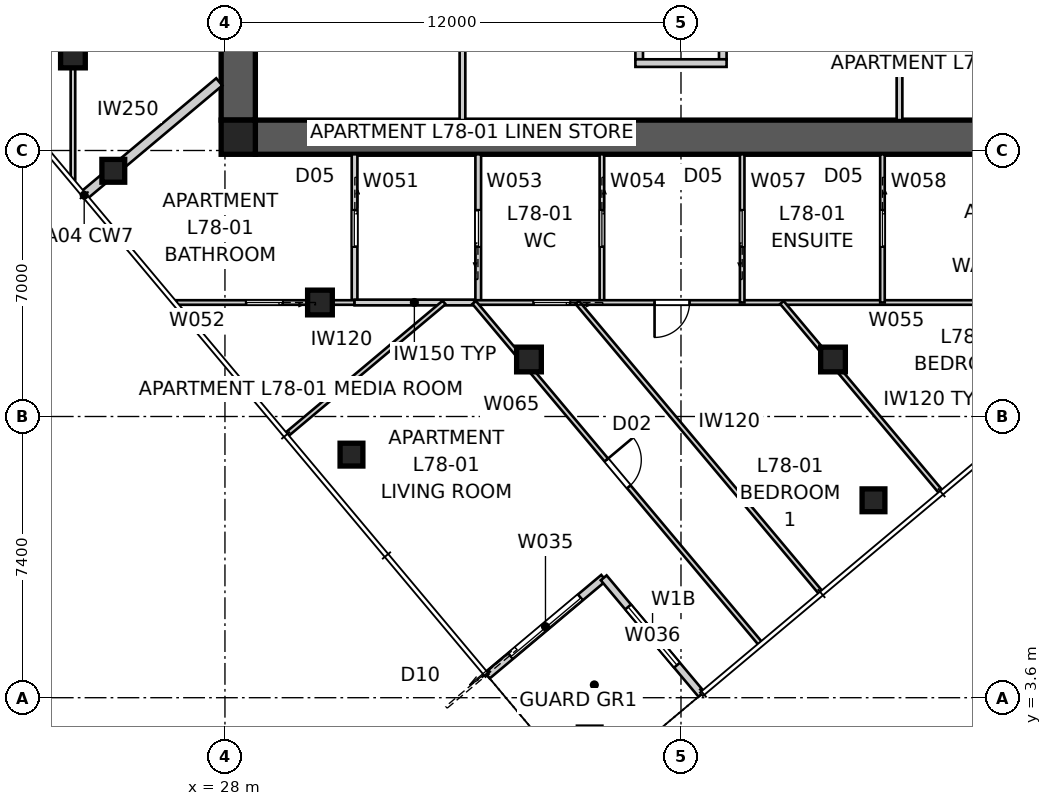
"""IFC4 building model, lengths in metres.
Left out: names, types, materials, properties, quantities, classifications, styles, units other than length and angle.
Written with IfcOpenShell. Run it as: python <this file> out.ifc"""

import sys

from ifc_helpers import new_model, si_unit, direction, frame, frame_2d, origin, origin_2d, place, context, subcontext, project, spatial, polyline, rectangle, outline, extrude, element, fill, save


model = new_model("IFC4")
c1 = context("Model", 3, precision=1e-05, world=origin(), true_north=direction((0.0, 1.0)))
c2 = subcontext(c1, "Body", "Model", "MODEL_VIEW")
j1 = project(units=[si_unit("LENGTHUNIT", "METRE"), si_unit("PLANEANGLEUNIT", "RADIAN")], contexts=[c1])
p1 = place(None, origin())
s1 = spatial("IfcSite", under=j1, at=p1, CompositionType="ELEMENT")
p2 = place(p1, origin())
s2 = spatial("IfcBuilding", under=s1, at=p2, CompositionType="ELEMENT")
p3 = place(p2, frame((0.0, 0.0, 282.8)))
s3 = spatial("IfcBuildingStorey", under=s2, at=p3, CompositionType="ELEMENT", Elevation=282.8)
p4 = place(p3, frame((51.2, 18.35, 0.0), z_axis=(0.0, 0.0, 1.0), x_axis=(-1.0, 0.0, 0.0)))
e1 = element("IfcWall", 1, at=p4, inside=s3, PredefinedType="SHEAR", context=c2, shape_type="SweptSolid", body=[
    extrude(outline(polyline([(0.0, -0.45), (22.4, -0.45), (22.4, -0.025), (22.85, -0.025), (22.85, 0.025), (22.4, 0.025), (22.4, 0.45), (0.0, 0.45), (0.0, 0.025), (-0.45, 0.025), (-0.45, -0.025), (0.0, -0.025), (0.0, -0.45)])), origin(), (0.0, 0.0, 1.0), 3.4),
])
p5 = place(p3, frame((28.35, 41.2, 0.0), z_axis=(0.0, 0.0, 1.0), x_axis=(0.0, -1.0, 0.0)))
e2 = element("IfcWall", 2, at=p5, inside=s3, PredefinedType="SHEAR", context=c2, shape_type="SweptSolid", body=[
    extrude(outline(polyline([(0.0, -0.45), (22.4, -0.45), (22.4, -0.025), (22.85, -0.025), (22.85, 0.025), (22.4, 0.025), (22.4, 0.45), (0.0, 0.45), (0.0, 0.025), (-0.45, 0.025), (-0.45, -0.025), (0.0, -0.025), (0.0, -0.45)])), origin(), (0.0, 0.0, 1.0), 3.4),
])
p6 = place(p5, frame((11.14, 0.0, 0.0)))
e3 = element("IfcOpeningElement", 3, at=p6, cuts=e2, PredefinedType="OPENING", context=c2, shape_type="SweptSolid", body=[
    extrude(rectangle(XDim=1.02, YDim=2.4, at=frame_2d((0.51, 1.2))), frame((0.0, 0.46, 0.0), z_axis=(0.0, -1.0, 0.0), x_axis=(1.0, 0.0, 0.0)), (0.0, 0.0, 1.0), 0.92),
])
for number, where, z_axis, x_axis in (
    (4, (38.9, 22.4, 0.0), (0.0, 0.0, 1.0), (0.0, -1.0, 0.0)),
    (5, (41.1, 22.4, 0.0), (0.0, 0.0, 1.0), (0.0, -1.0, 0.0)),
):
    element("IfcWall", number, at=place(p3, frame(where, z_axis=z_axis, x_axis=x_axis)), inside=s3, PredefinedType="SOLIDWALL", context=c2, shape_type="SweptSolid", body=[
        extrude(rectangle(XDim=2.0, YDim=0.2, at=frame_2d((1.0, 0.0))), origin(), (0.0, 0.0, 1.0), 3.4),
    ])
p7 = place(p3, frame((38.8, 20.3, 0.0), z_axis=(0.0, 0.0, 1.0), x_axis=(1.0, 0.0, 0.0)))
e6 = element("IfcWall", 6, at=p7, inside=s3, PredefinedType="SOLIDWALL", context=c2, shape_type="SweptSolid", body=[
    extrude(rectangle(XDim=2.4, YDim=0.2, at=frame_2d((1.2, 0.0))), origin(), (0.0, 0.0, 1.0), 3.4),
])
p8 = place(p3, frame((28.35, 18.35, 0.0), z_axis=(0.0, 0.0, 1.0), x_axis=(1.0, 0.0, 0.0)))
e7 = element("IfcColumn", 7, at=p8, inside=s3, PredefinedType="COLUMN", context=c2, shape_type="SweptSolid", body=[
    extrude(rectangle(XDim=0.9, YDim=0.9, at=origin_2d()), origin(), (0.0, 0.0, 1.0), 3.4),
])
for number, where, z_axis, x_axis in (
    (8, (45.065, 8.795, 0.0), (0.0, 0.0, 1.0), (1.0, 0.0, 0.0)),
    (9, (25.062, 17.466, 0.0), (0.0, 0.0, 1.0), (1.0, 0.0, 0.0)),
    (10, (31.329, 9.997, 0.0), (0.0, 0.0, 1.0), (1.0, 0.0, 0.0)),
):
    element("IfcColumn", number, at=place(p3, frame(where, z_axis=z_axis, x_axis=x_axis)), inside=s3, PredefinedType="COLUMN", context=c2, shape_type="SweptSolid", body=[
        extrude(rectangle(XDim=0.6, YDim=0.6, at=origin_2d()), origin(), (0.0, 0.0, 1.0), 3.4),
    ])
for number, where, z_axis, x_axis in (
    (11, (24.0, 20.5, 0.0), (0.0, 0.0, 1.0), (1.0, 0.0, 0.0)),
    (12, (30.5, 14.0, 0.0), (0.0, 0.0, 1.0), (1.0, 0.0, 0.0)),
    (13, (36.0, 12.5, 0.0), (0.0, 0.0, 1.0), (1.0, 0.0, 0.0)),
    (14, (44.0, 12.5, 0.0), (0.0, 0.0, 1.0), (1.0, 0.0, 0.0)),
):
    element("IfcColumn", number, at=place(p3, frame(where, z_axis=z_axis, x_axis=x_axis)), inside=s3, PredefinedType="COLUMN", context=c2, shape_type="SweptSolid", body=[
        extrude(rectangle(XDim=0.65, YDim=0.65, at=origin_2d()), origin(), (0.0, 0.0, 1.0), 3.4),
    ])
p9 = place(p3, frame((34.902, 4.183, 0.0), z_axis=(0.0, 0.0, 1.0), x_axis=(0.766060656284, 0.642768287094, 0.0)))
e15 = element("IfcWall", 15, at=p9, inside=s3, PredefinedType="SOLIDWALL", context=c2, shape_type="SweptSolid", body=[
    extrude(rectangle(XDim=4.0, YDim=0.2, at=frame_2d((2.0, 0.0))), origin(), (0.0, 0.0, 1.0), 3.25),
])
p10 = place(p9, frame((0.8, 0.0, 0.0)))
e16 = element("IfcOpeningElement", 16, at=p10, cuts=e15, PredefinedType="OPENING", context=c2, shape_type="SweptSolid", body=[
    extrude(rectangle(XDim=2.4, YDim=2.4, at=frame_2d((1.2, 1.2))), frame((0.0, 0.11, 0.0), z_axis=(0.0, -1.0, 0.0), x_axis=(1.0, 0.0, 0.0)), (0.0, 0.0, 1.0), 0.22),
])
p11 = place(p3, frame((37.966, 6.754, 0.0), z_axis=(0.0, 0.0, 1.0), x_axis=(0.642798342015, -0.766035437498, 0.0)))
e17 = element("IfcWall", 17, at=p11, inside=s3, PredefinedType="SOLIDWALL", context=c2, shape_type="SweptSolid", body=[
    extrude(rectangle(XDim=4.0, YDim=0.2, at=frame_2d((2.0, 0.0))), origin(), (0.0, 0.0, 1.0), 3.25),
])
p12 = place(p11, frame((1.0, 0.0, 0.45)))
e18 = element("IfcOpeningElement", 18, at=p12, cuts=e17, PredefinedType="OPENING", context=c2, shape_type="SweptSolid", body=[
    extrude(rectangle(XDim=2.0, YDim=1.8, at=frame_2d((1.0, 0.9))), frame((0.0, 0.11, 0.0), z_axis=(0.0, -1.0, 0.0), x_axis=(1.0, 0.0, 0.0)), (0.0, 0.0, 1.0), 0.22),
])
p13 = place(p3, frame((24.296, 16.823, 0.0), z_axis=(0.0, 0.0, 1.0), x_axis=(0.76603440109, 0.64279957712, 0.0)))
e19 = element("IfcWall", 19, at=p13, inside=s3, PredefinedType="PARTITIONING", context=c2, shape_type="SweptSolid", body=[
    extrude(rectangle(XDim=4.64, YDim=0.25, at=frame_2d((2.32, 0.0))), origin(), (0.0, 0.0, 1.0), 3.25),
])
p14 = place(p3, frame((45.75, 18.8, 0.0), z_axis=(0.0, 0.0, 1.0), x_axis=(0.0, 1.0, 0.0)))
e20 = element("IfcWall", 20, at=p14, inside=s3, PredefinedType="SOLIDWALL", context=c2, shape_type="SweptSolid", body=[
    extrude(rectangle(XDim=5.95, YDim=0.15, at=frame_2d((2.975, 0.0))), origin(), (0.0, 0.0, 1.0), 3.25),
])
p15 = place(p14, frame((2.515, 0.0, 0.0)))
e21 = element("IfcOpeningElement", 21, at=p15, cuts=e20, PredefinedType="OPENING", context=c2, shape_type="SweptSolid", body=[
    extrude(rectangle(XDim=0.92, YDim=2.1, at=frame_2d((0.46, 1.05))), frame((0.0, 0.085, 0.0), z_axis=(0.0, -1.0, 0.0), x_axis=(1.0, 0.0, 0.0)), (0.0, 0.0, 1.0), 0.17),
])
p16 = place(p3, frame((34.25, 18.8, 0.0), z_axis=(0.0, 0.0, 1.0), x_axis=(0.0, 1.0, 0.0)))
e22 = element("IfcWall", 22, at=p16, inside=s3, PredefinedType="SOLIDWALL", context=c2, shape_type="SweptSolid", body=[
    extrude(rectangle(XDim=5.9, YDim=0.15, at=frame_2d((2.95, 0.0))), origin(), (0.0, 0.0, 1.0), 3.25),
])
p17 = place(p3, frame((31.41, 17.9, 0.0), z_axis=(0.0, 0.0, 1.0), x_axis=(0.0, -1.0, 0.0)))
e23 = element("IfcWall", 23, at=p17, inside=s3, PredefinedType="SOLIDWALL", context=c2, shape_type="SweptSolid", body=[
    extrude(rectangle(XDim=3.9, YDim=0.15, at=frame_2d((1.95, 0.0))), origin(), (0.0, 0.0, 1.0), 3.25),
])
p18 = place(p17, frame((1.47, 0.0, 0.0)))
e24 = element("IfcOpeningElement", 24, at=p18, cuts=e23, PredefinedType="OPENING", context=c2, shape_type="SweptSolid", body=[
    extrude(rectangle(XDim=0.96, YDim=2.1, at=frame_2d((0.48, 1.05))), frame((0.0, 0.085, 0.0), z_axis=(0.0, -1.0, 0.0), x_axis=(1.0, 0.0, 0.0)), (0.0, 0.0, 1.0), 0.17),
])
p19 = place(p3, frame((31.41, 14.0, 0.0), z_axis=(0.0, 0.0, 1.0), x_axis=(-1.0, 0.0, 0.0)))
e25 = element("IfcWall", 25, at=p19, inside=s3, PredefinedType="PARTITIONING", context=c2, shape_type="SweptSolid", body=[
    extrude(rectangle(XDim=4.693, YDim=0.12, at=frame_2d((2.347, 0.0))), origin(), (0.0, 0.0, 1.0), 2.549),
])
p20 = place(p19, frame((1.893, 0.0, 0.0)))
e26 = element("IfcOpeningElement", 26, at=p20, cuts=e25, PredefinedType="OPENING", context=c2, shape_type="SweptSolid", body=[
    extrude(rectangle(XDim=0.96, YDim=2.1, at=frame_2d((0.48, 1.05))), frame((0.0, 0.07, 0.0), z_axis=(0.0, -1.0, 0.0), x_axis=(1.0, 0.0, 0.0)), (0.0, 0.0, 1.0), 0.14),
])
p21 = place(p3, frame((34.665, 14.0, 0.0), z_axis=(0.0, 0.0, 1.0), x_axis=(0.0, 1.0, 0.0)))
e27 = element("IfcWall", 27, at=p21, inside=s3, PredefinedType="SOLIDWALL", context=c2, shape_type="SweptSolid", body=[
    extrude(rectangle(XDim=3.9, YDim=0.15, at=frame_2d((1.95, 0.0))), origin(), (0.0, 0.0, 1.0), 3.25),
])
p22 = place(p21, frame((1.47, 0.0, 0.0)))
e28 = element("IfcOpeningElement", 28, at=p22, cuts=e27, PredefinedType="OPENING", context=c2, shape_type="SweptSolid", body=[
    extrude(rectangle(XDim=0.96, YDim=2.1, at=frame_2d((0.48, 1.05))), frame((0.0, 0.085, 0.0), z_axis=(0.0, -1.0, 0.0), x_axis=(1.0, 0.0, 0.0)), (0.0, 0.0, 1.0), 0.17),
])
p23 = place(p3, frame((37.919, 17.9, 0.0), z_axis=(0.0, 0.0, 1.0), x_axis=(0.0, -1.0, 0.0)))
e29 = element("IfcWall", 29, at=p23, inside=s3, PredefinedType="PARTITIONING", context=c2, shape_type="SweptSolid", body=[
    extrude(rectangle(XDim=3.9, YDim=0.12, at=frame_2d((1.95, 0.0))), origin(), (0.0, 0.0, 1.0), 3.25),
])
p24 = place(p23, frame((1.47, 0.0, 0.0)))
e30 = element("IfcOpeningElement", 30, at=p24, cuts=e29, PredefinedType="OPENING", context=c2, shape_type="SweptSolid", body=[
    extrude(rectangle(XDim=0.96, YDim=2.1, at=frame_2d((0.48, 1.05))), frame((0.0, 0.07, 0.0), z_axis=(0.0, -1.0, 0.0), x_axis=(1.0, 0.0, 0.0)), (0.0, 0.0, 1.0), 0.14),
])
p25 = place(p3, frame((51.625, 14.0, 0.0), z_axis=(0.0, 0.0, 1.0), x_axis=(-1.0, 0.0, 0.0)))
e31 = element("IfcWall", 31, at=p25, inside=s3, PredefinedType="PARTITIONING", context=c2, shape_type="SweptSolid", body=[
    extrude(rectangle(XDim=17.067, YDim=0.12, at=frame_2d((8.533, 0.0))), origin(), (0.0, 0.0, 1.0), 2.549),
])
p26 = place(p25, frame((2.702, 0.0, 0.0)))
e32 = element("IfcOpeningElement", 32, at=p26, cuts=e31, PredefinedType="OPENING", context=c2, shape_type="SweptSolid", body=[
    extrude(rectangle(XDim=0.92, YDim=2.34, at=frame_2d((0.46, 1.17))), frame((0.0, 0.07, 0.0), z_axis=(0.0, -1.0, 0.0), x_axis=(1.0, 0.0, 0.0)), (0.0, 0.0, 1.0), 0.14),
])
p27 = place(p25, frame((11.4, 0.0, 0.0)))
e33 = element("IfcOpeningElement", 33, at=p27, cuts=e31, PredefinedType="OPENING", context=c2, shape_type="SweptSolid", body=[
    extrude(rectangle(XDim=0.92, YDim=2.34, at=frame_2d((0.46, 1.17))), frame((0.0, 0.07, 0.0), z_axis=(0.0, -1.0, 0.0), x_axis=(1.0, 0.0, 0.0)), (0.0, 0.0, 1.0), 0.14),
])
p28 = place(p25, frame((14.544, 0.0, 0.0)))
e34 = element("IfcOpeningElement", 34, at=p28, cuts=e31, PredefinedType="OPENING", context=c2, shape_type="SweptSolid", body=[
    extrude(rectangle(XDim=0.96, YDim=2.1, at=frame_2d((0.48, 1.05))), frame((0.0, 0.07, 0.0), z_axis=(0.0, -1.0, 0.0), x_axis=(1.0, 0.0, 0.0)), (0.0, 0.0, 1.0), 0.14),
])
p29 = place(p3, frame((34.558, 14.0, 0.0), z_axis=(0.0, 0.0, 1.0), x_axis=(-1.0, 0.0, 0.0)))
e35 = element("IfcWall", 35, at=p29, inside=s3, PredefinedType="SOLIDWALL", context=c2, shape_type="SweptSolid", body=[
    extrude(rectangle(XDim=3.147, YDim=0.15, at=frame_2d((1.574, 0.0))), origin(), (0.0, 0.0, 1.0), 3.25),
])
p30 = place(p3, frame((41.61, 14.0, 0.0), z_axis=(0.0, 0.0, 1.0), x_axis=(0.0, 1.0, 0.0)))
e36 = element("IfcWall", 36, at=p30, inside=s3, PredefinedType="PARTITIONING", context=c2, shape_type="SweptSolid", body=[
    extrude(rectangle(XDim=3.9, YDim=0.12, at=frame_2d((1.95, 0.0))), origin(), (0.0, 0.0, 1.0), 3.25),
])
p31 = place(p30, frame((1.47, 0.0, 0.0)))
e37 = element("IfcOpeningElement", 37, at=p31, cuts=e36, PredefinedType="OPENING", context=c2, shape_type="SweptSolid", body=[
    extrude(rectangle(XDim=0.96, YDim=2.1, at=frame_2d((0.48, 1.05))), frame((0.0, 0.07, 0.0), z_axis=(0.0, -1.0, 0.0), x_axis=(1.0, 0.0, 0.0)), (0.0, 0.0, 1.0), 0.14),
])
p32 = place(p3, frame((45.301, 17.9, 0.0), z_axis=(0.0, 0.0, 1.0), x_axis=(0.0, -1.0, 0.0)))
e38 = element("IfcWall", 38, at=p32, inside=s3, PredefinedType="PARTITIONING", context=c2, shape_type="SweptSolid", body=[
    extrude(rectangle(XDim=3.9, YDim=0.12, at=frame_2d((1.95, 0.0))), origin(), (0.0, 0.0, 1.0), 3.25),
])
p33 = place(p32, frame((1.47, 0.0, 0.0)))
e39 = element("IfcOpeningElement", 39, at=p33, cuts=e38, PredefinedType="OPENING", context=c2, shape_type="SweptSolid", body=[
    extrude(rectangle(XDim=0.96, YDim=2.1, at=frame_2d((0.48, 1.05))), frame((0.0, 0.07, 0.0), z_axis=(0.0, -1.0, 0.0), x_axis=(1.0, 0.0, 0.0)), (0.0, 0.0, 1.0), 0.14),
])
p34 = place(p3, frame((34.558, 14.0, 0.0), z_axis=(0.0, 0.0, 1.0), x_axis=(0.642782931909, -0.766048368216, 0.0)))
e40 = element("IfcWall", 40, at=p34, inside=s3, PredefinedType="PARTITIONING", context=c2, shape_type="SweptSolid", body=[
    extrude(rectangle(XDim=11.701, YDim=0.12, at=frame_2d((5.851, 0.0))), origin(), (0.0, 0.0, 1.0), 3.25),
])
p35 = place(p34, frame((5.411, 0.0, 0.0)))
e41 = element("IfcOpeningElement", 41, at=p35, cuts=e40, PredefinedType="OPENING", context=c2, shape_type="SweptSolid", body=[
    extrude(rectangle(XDim=0.92, YDim=2.34, at=frame_2d((0.46, 1.17))), frame((0.0, 0.07, 0.0), z_axis=(0.0, -1.0, 0.0), x_axis=(1.0, 0.0, 0.0)), (0.0, 0.0, 1.0), 0.14),
])
p36 = place(p3, frame((29.63, 10.529, 0.0), z_axis=(0.0, 0.0, 1.0), x_axis=(0.766034275706, 0.642799726543, 0.0)))
e42 = element("IfcWall", 42, at=p36, inside=s3, PredefinedType="PARTITIONING", context=c2, shape_type="SweptSolid", body=[
    extrude(rectangle(XDim=5.4, YDim=0.12, at=frame_2d((2.7, 0.0))), origin(), (0.0, 0.0, 1.0), 3.25),
])
p37 = place(p3, frame((42.656, 14.0, 0.0), z_axis=(0.0, 0.0, 1.0), x_axis=(0.642779498388, -0.766051249233, 0.0)))
e43 = element("IfcWall", 43, at=p37, inside=s3, PredefinedType="PARTITIONING", context=c2, shape_type="SweptSolid", body=[
    extrude(rectangle(XDim=6.496, YDim=0.12, at=frame_2d((3.248, 0.0))), origin(), (0.0, 0.0, 1.0), 3.25),
])
p38 = place(p3, frame((43.672, 6.372, 0.0), z_axis=(0.0, 0.0, 1.0), x_axis=(-0.64278775678, 0.766044319693, 0.0)))
e44 = element("IfcWall", 44, at=p38, inside=s3, PredefinedType="PARTITIONING", context=c2, shape_type="SweptSolid", body=[
    extrude(rectangle(XDim=9.957, YDim=0.12, at=frame_2d((4.979, 0.0))), origin(), (0.0, 0.0, 1.0), 3.25),
])
p39 = place(p3, frame((24.0, 17.238, 0.0), z_axis=(0.0, 0.0, 1.0), x_axis=(0.0, 1.0, 0.0)))
e45 = element("IfcWall", 45, at=p39, inside=s3, PredefinedType="PARTITIONING", context=c2, shape_type="SweptSolid", body=[
    extrude(rectangle(XDim=26.045, YDim=0.12, at=frame_2d((13.022, 0.0))), origin(), (0.0, 0.0, 1.0), 2.549),
])
p40 = place(p39, frame((13.116, 0.0, 0.0)))
e46 = element("IfcOpeningElement", 46, at=p40, cuts=e45, PredefinedType="OPENING", context=c2, shape_type="SweptSolid", body=[
    extrude(rectangle(XDim=0.92, YDim=2.34, at=frame_2d((0.46, 1.17))), frame((0.0, 0.07, 0.0), z_axis=(0.0, -1.0, 0.0), x_axis=(1.0, 0.0, 0.0)), (0.0, 0.0, 1.0), 0.14),
])
p41 = place(p39, frame((15.705, 0.0, 0.0)))
e47 = element("IfcOpeningElement", 47, at=p41, cuts=e45, PredefinedType="OPENING", context=c2, shape_type="SweptSolid", body=[
    extrude(rectangle(XDim=0.92, YDim=2.34, at=frame_2d((0.46, 1.17))), frame((0.0, 0.07, 0.0), z_axis=(0.0, -1.0, 0.0), x_axis=(1.0, 0.0, 0.0)), (0.0, 0.0, 1.0), 0.14),
])
p42 = place(p39, frame((20.191, 0.0, 0.0)))
e48 = element("IfcOpeningElement", 48, at=p42, cuts=e45, PredefinedType="OPENING", context=c2, shape_type="SweptSolid", body=[
    extrude(rectangle(XDim=0.96, YDim=2.1, at=frame_2d((0.48, 1.05))), frame((0.0, 0.07, 0.0), z_axis=(0.0, -1.0, 0.0), x_axis=(1.0, 0.0, 0.0)), (0.0, 0.0, 1.0), 0.14),
])
p43 = place(p39, frame((3.631, 0.0, 0.0)))
e49 = element("IfcOpeningElement", 49, at=p43, cuts=e45, PredefinedType="OPENING", context=c2, shape_type="SweptSolid", body=[
    extrude(rectangle(XDim=0.92, YDim=2.34, at=frame_2d((0.46, 1.17))), frame((0.0, 0.07, 0.0), z_axis=(0.0, -1.0, 0.0), x_axis=(1.0, 0.0, 0.0)), (0.0, 0.0, 1.0), 0.14),
])
p44 = place(p10, origin())
e50 = element("IfcDoor", 50, at=p44, inside=s3, OperationType="SLIDING_TO_LEFT", PredefinedType="DOOR", context=c2, shape_type="SweptSolid", body=[
    extrude(rectangle(XDim=2.4, YDim=2.4, at=frame_2d((1.2, 1.2))), frame((0.0, 0.025, 0.0), z_axis=(0.0, -1.0, 0.0), x_axis=(1.0, 0.0, 0.0)), (0.0, 0.0, 1.0), 0.05),
])
fill(e16, e50)
p45 = place(p12, origin())
e51 = element("IfcWindow", 51, at=p45, inside=s3, PartitioningType="SINGLE_PANEL", PredefinedType="WINDOW", context=c2, shape_type="SweptSolid", body=[
    extrude(rectangle(XDim=2.0, YDim=1.8, at=frame_2d((1.0, 0.9))), frame((0.0, 0.03, 0.0), z_axis=(0.0, -1.0, 0.0), x_axis=(1.0, 0.0, 0.0)), (0.0, 0.0, 1.0), 0.06),
])
fill(e18, e51)
p46 = place(p33, origin())
e52 = element("IfcDoor", 52, at=p46, inside=s3, OperationType="SLIDING_TO_LEFT", PredefinedType="DOOR", context=c2, shape_type="SweptSolid", body=[
    extrude(rectangle(XDim=0.96, YDim=2.1, at=frame_2d((0.48, 1.05))), frame((0.0, 0.025, 0.0), z_axis=(0.0, -1.0, 0.0), x_axis=(1.0, 0.0, 0.0)), (0.0, 0.0, 1.0), 0.05),
])
fill(e39, e52)
p47 = place(p31, origin())
e53 = element("IfcDoor", 53, at=p47, inside=s3, OperationType="SLIDING_TO_LEFT", PredefinedType="DOOR", context=c2, shape_type="SweptSolid", body=[
    extrude(rectangle(XDim=0.96, YDim=2.1, at=frame_2d((0.48, 1.05))), frame((0.0, 0.025, 0.0), z_axis=(0.0, -1.0, 0.0), x_axis=(1.0, 0.0, 0.0)), (0.0, 0.0, 1.0), 0.05),
])
fill(e37, e53)
p48 = place(p24, origin())
e54 = element("IfcDoor", 54, at=p48, inside=s3, OperationType="SLIDING_TO_LEFT", PredefinedType="DOOR", context=c2, shape_type="SweptSolid", body=[
    extrude(rectangle(XDim=0.96, YDim=2.1, at=frame_2d((0.48, 1.05))), frame((0.0, 0.025, 0.0), z_axis=(0.0, -1.0, 0.0), x_axis=(1.0, 0.0, 0.0)), (0.0, 0.0, 1.0), 0.05),
])
fill(e30, e54)
p49 = place(p27, origin())
e55 = element("IfcDoor", 55, at=p49, inside=s3, OperationType="SINGLE_SWING_RIGHT", PredefinedType="DOOR", context=c2, shape_type="SweptSolid", body=[
    extrude(rectangle(XDim=0.92, YDim=2.34, at=frame_2d((0.46, 1.17))), frame((0.0, 0.025, 0.0), z_axis=(0.0, -1.0, 0.0), x_axis=(1.0, 0.0, 0.0)), (0.0, 0.0, 1.0), 0.05),
])
fill(e33, e55)
p50 = place(p22, origin())
e56 = element("IfcDoor", 56, at=p50, inside=s3, OperationType="SLIDING_TO_LEFT", PredefinedType="DOOR", context=c2, shape_type="SweptSolid", body=[
    extrude(rectangle(XDim=0.96, YDim=2.1, at=frame_2d((0.48, 1.05))), frame((0.0, 0.025, 0.0), z_axis=(0.0, -1.0, 0.0), x_axis=(1.0, 0.0, 0.0)), (0.0, 0.0, 1.0), 0.05),
])
fill(e28, e56)
p51 = place(p28, origin())
e57 = element("IfcDoor", 57, at=p51, inside=s3, OperationType="SLIDING_TO_LEFT", PredefinedType="DOOR", context=c2, shape_type="SweptSolid", body=[
    extrude(rectangle(XDim=0.96, YDim=2.1, at=frame_2d((0.48, 1.05))), frame((0.0, 0.025, 0.0), z_axis=(0.0, -1.0, 0.0), x_axis=(1.0, 0.0, 0.0)), (0.0, 0.0, 1.0), 0.05),
])
fill(e34, e57)
p52 = place(p18, origin())
e58 = element("IfcDoor", 58, at=p52, inside=s3, OperationType="SLIDING_TO_LEFT", PredefinedType="DOOR", context=c2, shape_type="SweptSolid", body=[
    extrude(rectangle(XDim=0.96, YDim=2.1, at=frame_2d((0.48, 1.05))), frame((0.0, 0.025, 0.0), z_axis=(0.0, -1.0, 0.0), x_axis=(1.0, 0.0, 0.0)), (0.0, 0.0, 1.0), 0.05),
])
fill(e24, e58)
p53 = place(p35, origin())
e59 = element("IfcDoor", 59, at=p53, inside=s3, OperationType="SINGLE_SWING_LEFT", PredefinedType="DOOR", context=c2, shape_type="SweptSolid", body=[
    extrude(rectangle(XDim=0.92, YDim=2.34, at=frame_2d((0.46, 1.17))), frame((0.0, 0.025, 0.0), z_axis=(0.0, -1.0, 0.0), x_axis=(1.0, 0.0, 0.0)), (0.0, 0.0, 1.0), 0.05),
])
fill(e41, e59)
p54 = place(p20, origin())
e60 = element("IfcDoor", 60, at=p54, inside=s3, OperationType="SLIDING_TO_LEFT", PredefinedType="DOOR", context=c2, shape_type="SweptSolid", body=[
    extrude(rectangle(XDim=0.96, YDim=2.1, at=frame_2d((0.48, 1.05))), frame((0.0, 0.025, 0.0), z_axis=(0.0, -1.0, 0.0), x_axis=(1.0, 0.0, 0.0)), (0.0, 0.0, 1.0), 0.05),
])
fill(e26, e60)
save(model, sys.argv[1])
